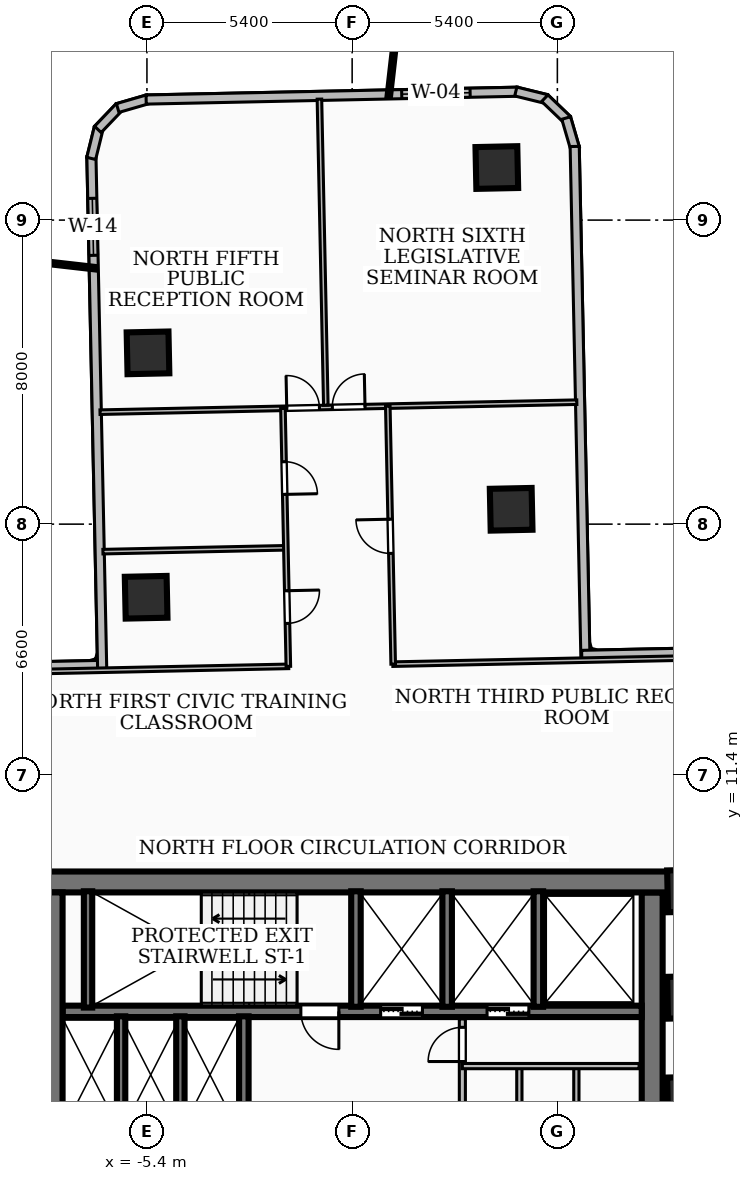
"""IFC4 building model, lengths in metres.
Left out: names, types, materials, properties, quantities, classifications, styles, units other than length and angle.
Written with IfcOpenShell. Run it as: python <this file> out.ifc"""

import sys

from ifc_helpers import new_model, si_unit, direction, frame, frame_2d, origin, origin_2d, place, context, subcontext, project, spatial, rectangle, extrude, element, fill, save


model = new_model("IFC4")
c1 = context("Model", 3, precision=1e-05, world=origin(), true_north=direction((0.0, 1.0)))
c2 = subcontext(c1, "Body", "Model", "MODEL_VIEW")
j1 = project(units=[si_unit("LENGTHUNIT", "METRE"), si_unit("PLANEANGLEUNIT", "RADIAN")], contexts=[c1])
p1 = place(None, origin())
s1 = spatial("IfcSite", under=j1, at=p1, CompositionType="ELEMENT")
p2 = place(p1, origin())
s2 = spatial("IfcBuilding", under=s1, at=p2, CompositionType="ELEMENT")
p3 = place(p2, frame((0.0, 0.0, 35.28)))
s3 = spatial("IfcBuildingStorey", under=s2, at=p3, CompositionType="ELEMENT", Elevation=35.28)
p4 = place(p3, frame((-8.78, 8.585, 0.0), z_axis=(0.0, 0.0, 1.0), x_axis=(1.0, 0.0, 0.0)))
e1 = element("IfcWall", 1, at=p4, inside=s3, PredefinedType="SHEAR", context=c2, shape_type="SweptSolid", body=[
    extrude(rectangle(XDim=17.56, YDim=0.55, at=frame_2d((8.78, 0.0))), origin(), (0.0, 0.0, 1.0), 3.34),
])
for number, where, z_axis, x_axis in (
    (2, (-7.895, 2.025, 0.0), (0.0, 0.0, 1.0), (0.0, 1.0, 0.0)),
    (3, (7.895, 8.31, 0.0), (0.0, 0.0, 1.0), (0.0, -1.0, 0.0)),
):
    element("IfcWall", number, at=place(p3, frame(where, z_axis=z_axis, x_axis=x_axis)), inside=s3, PredefinedType="SHEAR", context=c2, shape_type="SweptSolid", body=[
        extrude(rectangle(XDim=6.285, YDim=0.55, at=frame_2d((3.143, 0.0))), origin(), (0.0, 0.0, 1.0), 3.34),
    ])
p5 = place(p3, frame((7.62, 5.18, 0.0), z_axis=(0.0, 0.0, 1.0), x_axis=(-1.0, 0.0, 0.0)))
e4 = element("IfcWall", 4, at=p5, inside=s3, PredefinedType="SOLIDWALL", context=c2, shape_type="SweptSolid", body=[
    extrude(rectangle(XDim=15.24, YDim=0.3, at=frame_2d((7.62, 0.0))), origin(), (0.0, 0.0, 1.0), 3.34),
])
p6 = place(p5, frame((5.77, 0.0, 0.0)))
e5 = element("IfcOpeningElement", 5, at=p6, cuts=e4, PredefinedType="OPENING", context=c2, shape_type="SweptSolid", body=[
    extrude(rectangle(XDim=1.1, YDim=2.15, at=frame_2d((0.55, 1.075))), frame((0.0, 0.16, 0.0), z_axis=(0.0, -1.0, 0.0), x_axis=(1.0, 0.0, 0.0)), (0.0, 0.0, 1.0), 0.32),
])
p7 = place(p5, frame((2.97, 0.0, 0.0)))
e6 = element("IfcOpeningElement", 6, at=p7, cuts=e4, PredefinedType="OPENING", context=c2, shape_type="SweptSolid", body=[
    extrude(rectangle(XDim=1.1, YDim=2.15, at=frame_2d((0.55, 1.075))), frame((0.0, 0.16, 0.0), z_axis=(0.0, -1.0, 0.0), x_axis=(1.0, 0.0, 0.0)), (0.0, 0.0, 1.0), 0.32),
])
p8 = place(p5, frame((7.97, 0.0, 0.0)))
e7 = element("IfcOpeningElement", 7, at=p8, cuts=e4, PredefinedType="OPENING", context=c2, shape_type="SweptSolid", body=[
    extrude(rectangle(XDim=1.0, YDim=2.1, at=frame_2d((0.5, 1.05))), frame((0.0, 0.16, 0.0), z_axis=(0.0, -1.0, 0.0), x_axis=(1.0, 0.0, 0.0)), (0.0, 0.0, 1.0), 0.32),
])
p9 = place(p3, frame((-6.95, 5.28, 0.0), z_axis=(0.0, 0.0, 1.0), x_axis=(0.0, 1.0, 0.0)))
e8 = element("IfcWall", 8, at=p9, inside=s3, PredefinedType="SOLIDWALL", context=c2, shape_type="SweptSolid", body=[
    extrude(rectangle(XDim=3.06, YDim=0.22, at=frame_2d((1.53, 0.0))), origin(), (0.0, 0.0, 1.0), 3.34),
])
for number, where, z_axis, x_axis in (
    (9, (0.1, 5.3, 0.0), (0.0, 0.0, 1.0), (0.0, 1.0, 0.0)),
    (10, (2.5, 5.3, 0.0), (0.0, 0.0, 1.0), (0.0, 1.0, 0.0)),
    (11, (4.9, 5.3, 0.0), (0.0, 0.0, 1.0), (0.0, 1.0, 0.0)),
):
    element("IfcWall", number, at=place(p3, frame(where, z_axis=z_axis, x_axis=x_axis)), inside=s3, PredefinedType="SOLIDWALL", context=c2, shape_type="SweptSolid", body=[
        extrude(rectangle(XDim=3.04, YDim=0.25, at=frame_2d((1.52, 0.0))), origin(), (0.0, 0.0, 1.0), 3.34),
    ])
p10 = place(p3, frame((-2.85, 1.98, 0.0), z_axis=(0.0, 0.0, 1.0), x_axis=(0.0, 1.0, 0.0)))
e12 = element("IfcWall", 12, at=p10, inside=s3, PredefinedType="SOLIDWALL", context=c2, shape_type="SweptSolid", body=[
    extrude(rectangle(XDim=3.07, YDim=0.25, at=frame_2d((1.535, 0.0))), origin(), (0.0, 0.0, 1.0), 3.34),
])
for number, where, z_axis, x_axis in (
    (13, (-6.08, 1.98, 0.0), (0.0, 0.0, 1.0), (0.0, 1.0, 0.0)),
    (14, (-4.52, 1.98, 0.0), (0.0, 0.0, 1.0), (0.0, 1.0, 0.0)),
):
    element("IfcWall", number, at=place(p3, frame(where, z_axis=z_axis, x_axis=x_axis)), inside=s3, PredefinedType="SOLIDWALL", context=c2, shape_type="SweptSolid", body=[
        extrude(rectangle(XDim=3.07, YDim=0.22, at=frame_2d((1.535, 0.0))), origin(), (0.0, 0.0, 1.0), 3.34),
    ])
for number, where, z_axis, x_axis in (
    (15, (8.85, 2.9, 0.0), (0.0, 0.0, 1.0), (1.0, 0.021, 0.0)),
    (16, (8.85, 5.55, 0.0), (0.0, 0.0, 1.0), (1.0, 0.021, 0.0)),
    (17, (8.85, 8.35, 0.0), (0.0, 0.0, 1.0), (1.0, 0.021, 0.0)),
    (18, (4.184, 18.391, 0.0), (0.0, 0.0, 1.0), (1.0, 0.021, 0.0)),
    (19, (-5.421, 16.076, 0.0), (0.0, 0.0, 1.0), (1.0, 0.021, 0.0)),
    (20, (3.807, 27.383, 0.0), (0.0, 0.0, 1.0), (1.0, 0.021, 0.0)),
    (21, (-5.372, 22.507, 0.0), (0.0, 0.0, 1.0), (1.0, 0.021, 0.0)),
):
    element("IfcColumn", number, at=place(p3, frame(where, z_axis=z_axis, x_axis=x_axis)), inside=s3, PredefinedType="COLUMN", context=c2, shape_type="SweptSolid", body=[
        extrude(rectangle(XDim=1.1, YDim=1.1, at=origin_2d()), origin(), (0.0, 0.0, 1.0), 3.6),
    ])
p11 = place(p3, frame((-13.259, 14.155, 0.0), z_axis=(0.0, 0.0, 1.0), x_axis=(0.999777124284, 0.021111649844, 0.0)))
e22 = element("IfcWall", 22, at=p11, inside=s3, PredefinedType="SOLIDWALL", context=c2, shape_type="SweptSolid", body=[
    extrude(rectangle(XDim=6.777, YDim=0.24, at=frame_2d((3.388, 0.0))), origin(), (0.0, 0.0, 1.0), 3.34),
])
p12 = place(p3, frame((-6.578, 14.2, 0.0), z_axis=(0.0, 0.0, 1.0), x_axis=(-0.021016704444, 0.999779124674, 0.0)))
e23 = element("IfcWall", 23, at=p12, inside=s3, PredefinedType="SOLIDWALL", context=c2, shape_type="SweptSolid", body=[
    extrude(rectangle(XDim=13.475, YDim=0.24, at=frame_2d((6.738, 0.0))), origin(), (0.0, 0.0, 1.0), 3.34),
])
p13 = place(p12, frame((10.875, 0.0, 0.85)))
e24 = element("IfcOpeningElement", 24, at=p13, cuts=e23, PredefinedType="OPENING", context=c2, shape_type="SweptSolid", body=[
    extrude(rectangle(XDim=1.5, YDim=1.5, at=frame_2d((0.75, 0.75))), frame((0.0, 0.13, 0.0), z_axis=(0.0, -1.0, 0.0), x_axis=(1.0, 0.0, 0.0)), (0.0, 0.0, 1.0), 0.26),
])
p14 = place(p3, frame((-6.866, 27.623, 0.0), z_axis=(0.0, 0.0, 1.0), x_axis=(0.238860968489, 0.971053776952, 0.0)))
e25 = element("IfcWall", 25, at=p14, inside=s3, PredefinedType="SOLIDWALL", context=c2, shape_type="SweptSolid", body=[
    extrude(rectangle(XDim=0.829, YDim=0.24, at=frame_2d((0.415, 0.0))), origin(), (0.0, 0.0, 1.0), 3.34),
])
p15 = place(p3, frame((-6.691, 28.386, 0.0), z_axis=(0.0, 0.0, 1.0), x_axis=(0.690868229845, 0.722980697523, 0.0)))
e26 = element("IfcWall", 26, at=p15, inside=s3, PredefinedType="SOLIDWALL", context=c2, shape_type="SweptSolid", body=[
    extrude(rectangle(XDim=0.813, YDim=0.24, at=frame_2d((0.407, 0.0))), origin(), (0.0, 0.0, 1.0), 3.34),
])
p16 = place(p3, frame((-6.17, 28.949, 0.0), z_axis=(0.0, 0.0, 1.0), x_axis=(0.960564264415, 0.278058076541, 0.0)))
e27 = element("IfcWall", 27, at=p16, inside=s3, PredefinedType="SOLIDWALL", context=c2, shape_type="SweptSolid", body=[
    extrude(rectangle(XDim=0.831, YDim=0.24, at=frame_2d((0.415, 0.0))), origin(), (0.0, 0.0, 1.0), 3.34),
])
p17 = place(p3, frame((-5.421, 29.172, 0.0), z_axis=(0.0, 0.0, 1.0), x_axis=(0.999778461458, 0.021048230433, 0.0)))
e28 = element("IfcWall", 28, at=p17, inside=s3, PredefinedType="SOLIDWALL", context=c2, shape_type="SweptSolid", body=[
    extrude(rectangle(XDim=9.778, YDim=0.24, at=frame_2d((4.889, 0.0))), origin(), (0.0, 0.0, 1.0), 3.34),
])
p18 = place(p17, frame((6.727, 0.0, 0.85)))
e29 = element("IfcOpeningElement", 29, at=p18, cuts=e28, PredefinedType="OPENING", context=c2, shape_type="SweptSolid", body=[
    extrude(rectangle(XDim=1.8, YDim=2.0, at=frame_2d((0.9, 1.0))), frame((0.0, 0.13, 0.0), z_axis=(0.0, -1.0, 0.0), x_axis=(1.0, 0.0, 0.0)), (0.0, 0.0, 1.0), 0.26),
])
p19 = place(p3, frame((4.306, 29.383, 0.0), z_axis=(0.0, 0.0, 1.0), x_axis=(0.97113761746, -0.238519869098, 0.0)))
e30 = element("IfcWall", 30, at=p19, inside=s3, PredefinedType="SOLIDWALL", context=c2, shape_type="SweptSolid", body=[
    extrude(rectangle(XDim=0.83, YDim=0.24, at=frame_2d((0.415, 0.0))), origin(), (0.0, 0.0, 1.0), 3.34),
])
p20 = place(p3, frame((5.07, 29.208, 0.0), z_axis=(0.0, 0.0, 1.0), x_axis=(0.721663211076, -0.692244328095, 0.0)))
e31 = element("IfcWall", 31, at=p20, inside=s3, PredefinedType="SOLIDWALL", context=c2, shape_type="SweptSolid", body=[
    extrude(rectangle(XDim=0.813, YDim=0.24, at=frame_2d((0.407, 0.0))), origin(), (0.0, 0.0, 1.0), 3.34),
])
p21 = place(p3, frame((5.632, 28.686, 0.0), z_axis=(0.0, 0.0, 1.0), x_axis=(0.279378838128, -0.960180954199, 0.0)))
e32 = element("IfcWall", 32, at=p21, inside=s3, PredefinedType="SOLIDWALL", context=c2, shape_type="SweptSolid", body=[
    extrude(rectangle(XDim=0.83, YDim=0.24, at=frame_2d((0.415, 0.0))), origin(), (0.0, 0.0, 1.0), 3.34),
])
p22 = place(p3, frame((5.856, 27.938, 0.0), z_axis=(0.0, 0.0, 1.0), x_axis=(0.020997453553, -0.999779529168, 0.0)))
e33 = element("IfcWall", 33, at=p22, inside=s3, PredefinedType="SOLIDWALL", context=c2, shape_type="SweptSolid", body=[
    extrude(rectangle(XDim=13.476, YDim=0.24, at=frame_2d((6.738, 0.0))), origin(), (0.0, 0.0, 1.0), 2.421),
])
p23 = place(p3, frame((6.041, 14.559, 0.0), z_axis=(0.0, 0.0, 1.0), x_axis=(0.999776327957, 0.021149327571, 0.0)))
e34 = element("IfcWall", 34, at=p23, inside=s3, PredefinedType="SOLIDWALL", context=c2, shape_type="SweptSolid", body=[
    extrude(rectangle(XDim=6.615, YDim=0.24, at=frame_2d((3.307, 0.0))), origin(), (0.0, 0.0, 1.0), 2.421),
])
p24 = place(p3, frame((2.9, 2.04, 0.0), z_axis=(0.0, 0.0, 1.0), x_axis=(0.0, 1.0, 0.0)))
e35 = element("IfcWall", 35, at=p24, inside=s3, PredefinedType="PARTITIONING", context=c2, shape_type="SweptSolid", body=[
    extrude(rectangle(XDim=2.94, YDim=0.16, at=frame_2d((1.47, 0.0))), origin(), (0.0, 0.0, 1.0), 2.405),
])
p25 = place(p24, frame((1.82, 0.0, 0.0)))
e36 = element("IfcOpeningElement", 36, at=p25, cuts=e35, PredefinedType="OPENING", context=c2, shape_type="SweptSolid", body=[
    extrude(rectangle(XDim=0.9, YDim=2.06, at=frame_2d((0.45, 1.03))), frame((0.0, 0.09, 0.0), z_axis=(0.0, -1.0, 0.0), x_axis=(1.0, 0.0, 0.0)), (0.0, 0.0, 1.0), 0.18),
])
p26 = place(p3, frame((2.9, 3.74, 0.0), z_axis=(0.0, 0.0, 1.0), x_axis=(1.0, 0.0, 0.0)))
e37 = element("IfcWall", 37, at=p26, inside=s3, PredefinedType="PARTITIONING", context=c2, shape_type="SweptSolid", body=[
    extrude(rectangle(XDim=4.65, YDim=0.138, at=frame_2d((2.325, 0.0))), origin(), (0.0, 0.0, 1.0), 3.34),
])
for number, where, z_axis, x_axis in (
    (38, (4.4, 1.85, 0.0), (0.0, 0.0, 1.0), (0.0, 1.0, 0.0)),
    (39, (5.9, 1.85, 0.0), (0.0, 0.0, 1.0), (0.0, 1.0, 0.0)),
):
    element("IfcWall", number, at=place(p3, frame(where, z_axis=z_axis, x_axis=x_axis)), inside=s3, PredefinedType="PARTITIONING", context=c2, shape_type="SweptSolid", body=[
        extrude(rectangle(XDim=1.89, YDim=0.138, at=frame_2d((0.945, 0.0))), origin(), (0.0, 0.0, 1.0), 2.405),
    ])
p27 = place(p3, frame((-1.669, 14.258, 0.0), z_axis=(0.0, 0.0, 1.0), x_axis=(-0.999782991422, -0.020831948152, 0.0)))
e40 = element("IfcWall", 40, at=p27, inside=s3, PredefinedType="PARTITIONING", context=c2, shape_type="SweptSolid", body=[
    extrude(rectangle(XDim=8.11, YDim=0.12, at=frame_2d((4.055, 0.0))), origin(), (0.0, 0.0, 1.0), 2.421),
])
p28 = place(p3, frame((9.018, 14.482, 0.0), z_axis=(0.0, 0.0, 1.0), x_axis=(-0.999781922757, -0.020883173321, 0.0)))
e41 = element("IfcWall", 41, at=p28, inside=s3, PredefinedType="PARTITIONING", context=c2, shape_type="SweptSolid", body=[
    extrude(rectangle(XDim=7.95, YDim=0.12, at=frame_2d((3.975, 0.0))), origin(), (0.0, 0.0, 1.0), 2.421),
])
p29 = place(p3, frame((-1.764, 17.377, 0.0), z_axis=(0.0, 0.0, 1.0), x_axis=(-0.99977783499, -0.021077966272, 0.0)))
e42 = element("IfcWall", 42, at=p29, inside=s3, PredefinedType="PARTITIONING", context=c2, shape_type="SweptSolid", body=[
    extrude(rectangle(XDim=4.795, YDim=0.12, at=frame_2d((2.397, 0.0))), origin(), (0.0, 0.0, 1.0), 2.421),
])
p30 = place(p3, frame((-1.821, 21.046, 0.0), z_axis=(0.0, 0.0, 1.0), x_axis=(0.020928408033, -0.999780976883, 0.0)))
e43 = element("IfcWall", 43, at=p30, inside=s3, PredefinedType="PARTITIONING", context=c2, shape_type="SweptSolid", body=[
    extrude(rectangle(XDim=6.789, YDim=0.12, at=frame_2d((3.395, 0.0))), origin(), (0.0, 0.0, 1.0), 2.869),
])
p31 = place(p30, frame((4.799, 0.0, 0.0)))
e44 = element("IfcOpeningElement", 44, at=p31, cuts=e43, PredefinedType="OPENING", context=c2, shape_type="SweptSolid", body=[
    extrude(rectangle(XDim=0.86, YDim=2.04, at=frame_2d((0.43, 1.02))), frame((0.0, 0.07, 0.0), z_axis=(0.0, -1.0, 0.0), x_axis=(1.0, 0.0, 0.0)), (0.0, 0.0, 1.0), 0.14),
])
p32 = place(p30, frame((1.404, 0.0, 0.0)))
e45 = element("IfcOpeningElement", 45, at=p32, cuts=e43, PredefinedType="OPENING", context=c2, shape_type="SweptSolid", body=[
    extrude(rectangle(XDim=0.86, YDim=2.04, at=frame_2d((0.43, 1.02))), frame((0.0, 0.07, 0.0), z_axis=(0.0, -1.0, 0.0), x_axis=(1.0, 0.0, 0.0)), (0.0, 0.0, 1.0), 0.14),
])
p33 = place(p3, frame((1.08, 14.316, 0.0), z_axis=(0.0, 0.0, 1.0), x_axis=(-0.020927655651, 0.999780992632, 0.0)))
e46 = element("IfcWall", 46, at=p33, inside=s3, PredefinedType="PARTITIONING", context=c2, shape_type="SweptSolid", body=[
    extrude(rectangle(XDim=6.79, YDim=0.12, at=frame_2d((3.395, 0.0))), origin(), (0.0, 0.0, 1.0), 2.869),
])
p34 = place(p33, frame((2.915, 0.0, 0.0)))
e47 = element("IfcOpeningElement", 47, at=p34, cuts=e46, PredefinedType="OPENING", context=c2, shape_type="SweptSolid", body=[
    extrude(rectangle(XDim=0.9, YDim=2.06, at=frame_2d((0.45, 1.03))), frame((0.0, 0.07, 0.0), z_axis=(0.0, -1.0, 0.0), x_axis=(1.0, 0.0, 0.0)), (0.0, 0.0, 1.0), 0.14),
])
p35 = place(p3, frame((-0.693, 21.13, 0.0), z_axis=(0.0, 0.0, 1.0), x_axis=(-0.020852798128, 0.999782556764, 0.0)))
e48 = element("IfcWall", 48, at=p35, inside=s3, PredefinedType="PARTITIONING", context=c2, shape_type="SweptSolid", body=[
    extrude(rectangle(XDim=8.055, YDim=0.12, at=frame_2d((4.027, 0.0))), origin(), (0.0, 0.0, 1.0), 2.72),
])
p36 = place(p3, frame((-6.635, 20.946, 0.0), z_axis=(0.0, 0.0, 1.0), x_axis=(0.999780491948, 0.020951561299, 0.0)))
e49 = element("IfcWall", 49, at=p36, inside=s3, PredefinedType="PARTITIONING", context=c2, shape_type="SweptSolid", body=[
    extrude(rectangle(XDim=12.55, YDim=0.12, at=frame_2d((6.275, 0.0))), origin(), (0.0, 0.0, 1.0), 2.421),
])
p37 = place(p36, frame((6.115, 0.0, 0.0)))
e50 = element("IfcOpeningElement", 50, at=p37, cuts=e49, PredefinedType="OPENING", context=c2, shape_type="SweptSolid", body=[
    extrude(rectangle(XDim=0.86, YDim=2.04, at=frame_2d((0.43, 1.02))), frame((0.0, 0.07, 0.0), z_axis=(0.0, -1.0, 0.0), x_axis=(1.0, 0.0, 0.0)), (0.0, 0.0, 1.0), 0.14),
])
p38 = place(p36, frame((4.915, 0.0, 0.0)))
e51 = element("IfcOpeningElement", 51, at=p38, cuts=e49, PredefinedType="OPENING", context=c2, shape_type="SweptSolid", body=[
    extrude(rectangle(XDim=0.86, YDim=2.04, at=frame_2d((0.43, 1.02))), frame((0.0, 0.07, 0.0), z_axis=(0.0, -1.0, 0.0), x_axis=(1.0, 0.0, 0.0)), (0.0, 0.0, 1.0), 0.14),
])
p39 = place(p13, origin())
e52 = element("IfcWindow", 52, at=p39, inside=s3, PartitioningType="SINGLE_PANEL", PredefinedType="WINDOW", context=c2, shape_type="SweptSolid", body=[
    extrude(rectangle(XDim=1.5, YDim=1.5, at=frame_2d((0.75, 0.75))), frame((0.0, 0.03, 0.0), z_axis=(0.0, -1.0, 0.0), x_axis=(1.0, 0.0, 0.0)), (0.0, 0.0, 1.0), 0.06),
])
fill(e24, e52)
p40 = place(p18, origin())
e53 = element("IfcWindow", 53, at=p40, inside=s3, PartitioningType="SINGLE_PANEL", PredefinedType="WINDOW", context=c2, shape_type="SweptSolid", body=[
    extrude(rectangle(XDim=1.8, YDim=2.0, at=frame_2d((0.9, 1.0))), frame((0.0, 0.03, 0.0), z_axis=(0.0, -1.0, 0.0), x_axis=(1.0, 0.0, 0.0)), (0.0, 0.0, 1.0), 0.06),
])
fill(e29, e53)
p41 = place(p6, origin())
e54 = element("IfcDoor", 54, at=p41, inside=s3, OperationType="DOUBLE_DOOR_SLIDING", PredefinedType="DOOR", context=c2, shape_type="SweptSolid", body=[
    extrude(rectangle(XDim=1.1, YDim=2.15, at=frame_2d((0.55, 1.075))), frame((0.0, 0.025, 0.0), z_axis=(0.0, -1.0, 0.0), x_axis=(1.0, 0.0, 0.0)), (0.0, 0.0, 1.0), 0.05),
])
fill(e5, e54)
p42 = place(p7, origin())
e55 = element("IfcDoor", 55, at=p42, inside=s3, OperationType="DOUBLE_DOOR_SLIDING", PredefinedType="DOOR", context=c2, shape_type="SweptSolid", body=[
    extrude(rectangle(XDim=1.1, YDim=2.15, at=frame_2d((0.55, 1.075))), frame((0.0, 0.025, 0.0), z_axis=(0.0, -1.0, 0.0), x_axis=(1.0, 0.0, 0.0)), (0.0, 0.0, 1.0), 0.05),
])
fill(e6, e55)
p43 = place(p8, origin())
e56 = element("IfcDoor", 56, at=p43, inside=s3, OperationType="SINGLE_SWING_LEFT", PredefinedType="DOOR", context=c2, shape_type="SweptSolid", body=[
    extrude(rectangle(XDim=1.0, YDim=2.1, at=frame_2d((0.5, 1.05))), frame((0.0, 0.025, 0.0), z_axis=(0.0, -1.0, 0.0), x_axis=(1.0, 0.0, 0.0)), (0.0, 0.0, 1.0), 0.05),
])
fill(e7, e56)
p44 = place(p25, origin())
e57 = element("IfcDoor", 57, at=p44, inside=s3, OperationType="SINGLE_SWING_LEFT", PredefinedType="DOOR", context=c2, shape_type="SweptSolid", body=[
    extrude(rectangle(XDim=0.9, YDim=2.06, at=frame_2d((0.45, 1.03))), frame((0.0, 0.025, 0.0), z_axis=(0.0, -1.0, 0.0), x_axis=(1.0, 0.0, 0.0)), (0.0, 0.0, 1.0), 0.05),
])
fill(e36, e57)
p45 = place(p31, origin())
e58 = element("IfcDoor", 58, at=p45, inside=s3, OperationType="SINGLE_SWING_LEFT", PredefinedType="DOOR", context=c2, shape_type="SweptSolid", body=[
    extrude(rectangle(XDim=0.86, YDim=2.04, at=frame_2d((0.43, 1.02))), frame((0.0, 0.025, 0.0), z_axis=(0.0, -1.0, 0.0), x_axis=(1.0, 0.0, 0.0)), (0.0, 0.0, 1.0), 0.05),
])
fill(e44, e58)
p46 = place(p32, origin())
e59 = element("IfcDoor", 59, at=p46, inside=s3, OperationType="SINGLE_SWING_RIGHT", PredefinedType="DOOR", context=c2, shape_type="SweptSolid", body=[
    extrude(rectangle(XDim=0.86, YDim=2.04, at=frame_2d((0.43, 1.02))), frame((0.0, 0.025, 0.0), z_axis=(0.0, -1.0, 0.0), x_axis=(1.0, 0.0, 0.0)), (0.0, 0.0, 1.0), 0.05),
])
fill(e45, e59)
p47 = place(p34, origin())
e60 = element("IfcDoor", 60, at=p47, inside=s3, OperationType="SINGLE_SWING_RIGHT", PredefinedType="DOOR", context=c2, shape_type="SweptSolid", body=[
    extrude(rectangle(XDim=0.9, YDim=2.06, at=frame_2d((0.45, 1.03))), frame((0.0, 0.025, 0.0), z_axis=(0.0, -1.0, 0.0), x_axis=(1.0, 0.0, 0.0)), (0.0, 0.0, 1.0), 0.05),
])
fill(e47, e60)
p48 = place(p37, origin())
e61 = element("IfcDoor", 61, at=p48, inside=s3, OperationType="SINGLE_SWING_RIGHT", PredefinedType="DOOR", context=c2, shape_type="SweptSolid", body=[
    extrude(rectangle(XDim=0.86, YDim=2.04, at=frame_2d((0.43, 1.02))), frame((0.0, 0.025, 0.0), z_axis=(0.0, -1.0, 0.0), x_axis=(1.0, 0.0, 0.0)), (0.0, 0.0, 1.0), 0.05),
])
fill(e50, e61)
p49 = place(p38, origin())
e62 = element("IfcDoor", 62, at=p49, inside=s3, OperationType="SINGLE_SWING_LEFT", PredefinedType="DOOR", context=c2, shape_type="SweptSolid", body=[
    extrude(rectangle(XDim=0.86, YDim=2.04, at=frame_2d((0.43, 1.02))), frame((0.0, 0.025, 0.0), z_axis=(0.0, -1.0, 0.0), x_axis=(1.0, 0.0, 0.0)), (0.0, 0.0, 1.0), 0.05),
])
fill(e51, e62)
save(model, sys.argv[1])
